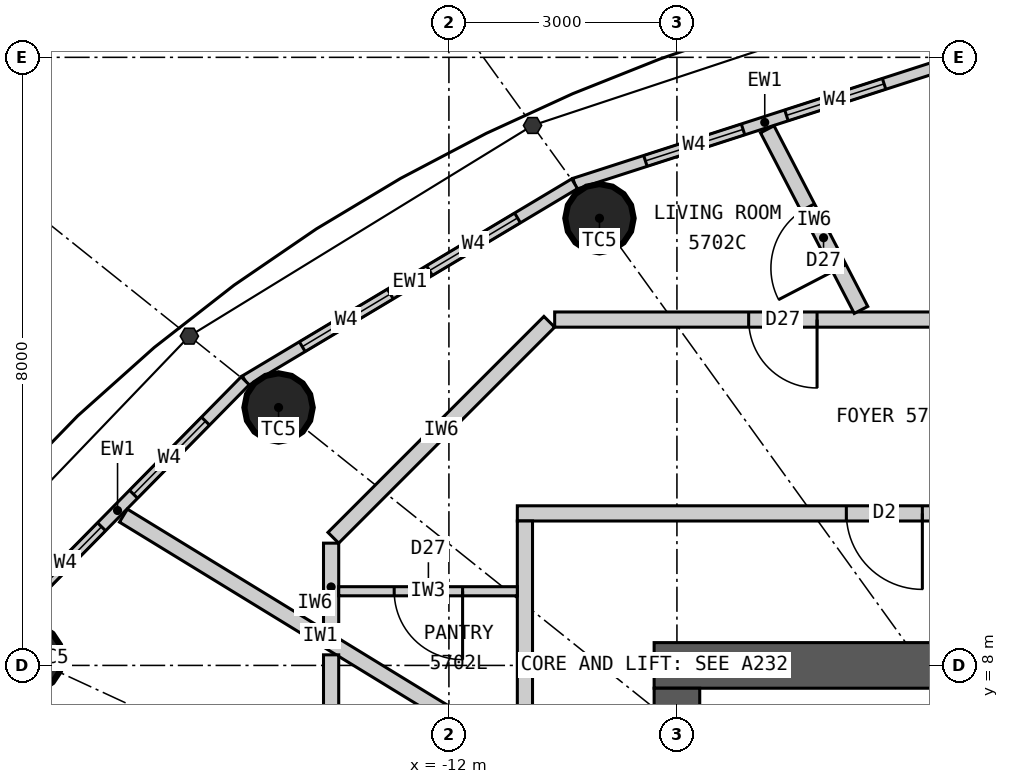
"""IFC4 building model, lengths in metres.
Left out: names, types, materials, properties, quantities, classifications, styles, units other than length and angle.
Written with IfcOpenShell. Run it as: python <this file> out.ifc"""

import sys

from ifc_helpers import new_model, si_unit, direction, frame, frame_2d, origin, origin_2d, place, context, subcontext, project, spatial, rectangle, circle, extrude, element, fill, save


model = new_model("IFC4")
c1 = context("Model", 3, precision=1e-05, world=origin(), true_north=direction((0.0, 1.0)))
c2 = subcontext(c1, "Body", "Model", "MODEL_VIEW")
j1 = project(units=[si_unit("LENGTHUNIT", "METRE"), si_unit("PLANEANGLEUNIT", "RADIAN")], contexts=[c1])
p1 = place(None, origin())
s1 = spatial("IfcSite", under=j1, at=p1, CompositionType="ELEMENT")
p2 = place(p1, origin())
s2 = spatial("IfcBuilding", under=s1, at=p2, CompositionType="ELEMENT")
p3 = place(p2, frame((0.0, 0.0, 212.7)))
s3 = spatial("IfcBuildingStorey", under=s2, at=p3, CompositionType="ELEMENT", Elevation=212.7)
for number, where, z_axis, x_axis in (
    (1, (-10.019, 13.883, 0.0), (0.0, 0.0, 1.0), (1.0, 0.0, 0.0)),
    (2, (-14.241, 11.393, 0.0), (0.0, 0.0, 1.0), (1.0, 0.0, 0.0)),
    (3, (-17.532, 8.098, 0.0), (0.0, 0.0, 1.0), (1.0, 0.0, 0.0)),
):
    element("IfcColumn", number, at=place(p3, frame(where, z_axis=z_axis, x_axis=x_axis)), inside=s3, PredefinedType="COLUMN", context=c2, shape_type="SweptSolid", body=[
        extrude(circle(Radius=0.45, at=origin_2d()), origin(), (0.0, 0.0, 1.0), 3.3),
    ])
p4 = place(p3, frame((-9.3, 8.0, 0.0), z_axis=(0.0, 0.0, 1.0), x_axis=(1.0, 0.0, 0.0)))
e4 = element("IfcWall", 4, at=p4, inside=s3, PredefinedType="SHEAR", context=c2, shape_type="SweptSolid", body=[
    extrude(rectangle(XDim=18.6, YDim=0.6, at=frame_2d((9.3, 0.0))), origin(), (0.0, 0.0, 1.0), 3.3),
])
p5 = place(p4, frame((8.0, 0.0, 0.0)))
e5 = element("IfcOpeningElement", 5, at=p5, cuts=e4, PredefinedType="OPENING", context=c2, shape_type="SweptSolid", body=[
    extrude(rectangle(XDim=1.2, YDim=2.2, at=frame_2d((0.6, 1.1))), frame((0.0, 0.31, 0.0), z_axis=(0.0, -1.0, 0.0), x_axis=(1.0, 0.0, 0.0)), (0.0, 0.0, 1.0), 0.62),
])
p6 = place(p4, frame((15.6, 0.0, 0.0)))
e6 = element("IfcOpeningElement", 6, at=p6, cuts=e4, PredefinedType="OPENING", context=c2, shape_type="SweptSolid", body=[
    extrude(rectangle(XDim=0.9, YDim=2.2, at=frame_2d((0.45, 1.1))), frame((0.0, 0.31, 0.0), z_axis=(0.0, -1.0, 0.0), x_axis=(1.0, 0.0, 0.0)), (0.0, 0.0, 1.0), 0.62),
])
p7 = place(p3, frame((-9.0, 7.7, 0.0), z_axis=(0.0, 0.0, 1.0), x_axis=(0.0, -1.0, 0.0)))
e7 = element("IfcWall", 7, at=p7, inside=s3, PredefinedType="SHEAR", context=c2, shape_type="SweptSolid", body=[
    extrude(rectangle(XDim=15.4, YDim=0.6, at=frame_2d((7.7, 0.0))), origin(), (0.0, 0.0, 1.0), 3.3),
])
p8 = place(p7, frame((6.8, 0.0, 0.0)))
e8 = element("IfcOpeningElement", 8, at=p8, cuts=e7, PredefinedType="OPENING", context=c2, shape_type="SweptSolid", body=[
    extrude(rectangle(XDim=1.8, YDim=2.2, at=frame_2d((0.9, 1.1))), frame((0.0, 0.31, 0.0), z_axis=(0.0, -1.0, 0.0), x_axis=(1.0, 0.0, 0.0)), (0.0, 0.0, 1.0), 0.62),
])
p9 = place(p3, frame((-5.343, 15.952, 0.0), z_axis=(0.0, 0.0, 1.0), x_axis=(-0.951644702515, -0.307200846638, 0.0)))
e9 = element("IfcWall", 9, at=p9, inside=s3, PredefinedType="ELEMENTEDWALL", context=c2, shape_type="SweptSolid", body=[
    extrude(rectangle(XDim=5.258, YDim=0.15, at=frame_2d((2.629, 0.0))), origin(), (0.0, 0.0, 1.0), 3.12),
])
p10 = place(p9, frame((0.979, 0.0, 0.9)))
e10 = element("IfcOpeningElement", 10, at=p10, cuts=e9, PredefinedType="OPENING", context=c2, shape_type="SweptSolid", body=[
    extrude(rectangle(XDim=1.35, YDim=1.9, at=frame_2d((0.675, 0.95))), frame((0.0, 0.085, 0.0), z_axis=(0.0, -1.0, 0.0), x_axis=(1.0, 0.0, 0.0)), (0.0, 0.0, 1.0), 0.17),
])
p11 = place(p9, frame((2.929, 0.0, 0.9)))
e11 = element("IfcOpeningElement", 11, at=p11, cuts=e9, PredefinedType="OPENING", context=c2, shape_type="SweptSolid", body=[
    extrude(rectangle(XDim=1.35, YDim=1.9, at=frame_2d((0.675, 0.95))), frame((0.0, 0.085, 0.0), z_axis=(0.0, -1.0, 0.0), x_axis=(1.0, 0.0, 0.0)), (0.0, 0.0, 1.0), 0.17),
])
p12 = place(p3, frame((-10.346, 14.336, 0.0), z_axis=(0.0, 0.0, 1.0), x_axis=(-0.85822150553, -0.513279502265, 0.0)))
e12 = element("IfcWall", 12, at=p12, inside=s3, PredefinedType="ELEMENTEDWALL", context=c2, shape_type="SweptSolid", body=[
    extrude(rectangle(XDim=5.05, YDim=0.15, at=frame_2d((2.525, 0.0))), origin(), (0.0, 0.0, 1.0), 3.12),
])
p13 = place(p12, frame((0.875, 0.0, 0.9)))
e13 = element("IfcOpeningElement", 13, at=p13, cuts=e12, PredefinedType="OPENING", context=c2, shape_type="SweptSolid", body=[
    extrude(rectangle(XDim=1.35, YDim=1.9, at=frame_2d((0.675, 0.95))), frame((0.0, 0.085, 0.0), z_axis=(0.0, -1.0, 0.0), x_axis=(1.0, 0.0, 0.0)), (0.0, 0.0, 1.0), 0.17),
])
p14 = place(p12, frame((2.825, 0.0, 0.9)))
e14 = element("IfcOpeningElement", 14, at=p14, cuts=e12, PredefinedType="OPENING", context=c2, shape_type="SweptSolid", body=[
    extrude(rectangle(XDim=1.35, YDim=1.9, at=frame_2d((0.675, 0.95))), frame((0.0, 0.085, 0.0), z_axis=(0.0, -1.0, 0.0), x_axis=(1.0, 0.0, 0.0)), (0.0, 0.0, 1.0), 0.17),
])
p15 = place(p3, frame((-14.68, 11.744, 0.0), z_axis=(0.0, 0.0, 1.0), x_axis=(-0.701527379618, -0.712642501993, 0.0)))
e15 = element("IfcWall", 15, at=p15, inside=s3, PredefinedType="ELEMENTEDWALL", context=c2, shape_type="SweptSolid", body=[
    extrude(rectangle(XDim=4.788, YDim=0.15, at=frame_2d((2.394, 0.0))), origin(), (0.0, 0.0, 1.0), 3.12),
])
p16 = place(p15, frame((0.744, 0.0, 0.9)))
e16 = element("IfcOpeningElement", 16, at=p16, cuts=e15, PredefinedType="OPENING", context=c2, shape_type="SweptSolid", body=[
    extrude(rectangle(XDim=1.35, YDim=1.9, at=frame_2d((0.675, 0.95))), frame((0.0, 0.085, 0.0), z_axis=(0.0, -1.0, 0.0), x_axis=(1.0, 0.0, 0.0)), (0.0, 0.0, 1.0), 0.17),
])
p17 = place(p15, frame((2.694, 0.0, 0.9)))
e17 = element("IfcOpeningElement", 17, at=p17, cuts=e15, PredefinedType="OPENING", context=c2, shape_type="SweptSolid", body=[
    extrude(rectangle(XDim=1.35, YDim=1.9, at=frame_2d((0.675, 0.95))), frame((0.0, 0.085, 0.0), z_axis=(0.0, -1.0, 0.0), x_axis=(1.0, 0.0, 0.0)), (0.0, 0.0, 1.0), 0.17),
])
p18 = place(p3, frame((-11.1, 10.0, 0.0), z_axis=(0.0, 0.0, 1.0), x_axis=(1.0, 0.0, 0.0)))
e18 = element("IfcWall", 18, at=p18, inside=s3, PredefinedType="PARTITIONING", context=c2, shape_type="SweptSolid", body=[
    extrude(rectangle(XDim=22.2, YDim=0.2, at=frame_2d((11.1, 0.0))), origin(), (0.0, 0.0, 1.0), 3.12),
])
p19 = place(p18, frame((20.9, 0.0, 0.0)))
e19 = element("IfcOpeningElement", 19, at=p19, cuts=e18, PredefinedType="OPENING", context=c2, shape_type="SweptSolid", body=[
    extrude(rectangle(XDim=1.0, YDim=2.2, at=frame_2d((0.5, 1.1))), frame((0.0, 0.11, 0.0), z_axis=(0.0, -1.0, 0.0), x_axis=(1.0, 0.0, 0.0)), (0.0, 0.0, 1.0), 0.22),
])
p20 = place(p18, frame((4.329, 0.0, 0.0)))
e20 = element("IfcOpeningElement", 20, at=p20, cuts=e18, PredefinedType="OPENING", context=c2, shape_type="SweptSolid", body=[
    extrude(rectangle(XDim=1.0, YDim=2.2, at=frame_2d((0.5, 1.1))), frame((0.0, 0.11, 0.0), z_axis=(0.0, -1.0, 0.0), x_axis=(1.0, 0.0, 0.0)), (0.0, 0.0, 1.0), 0.22),
])
p21 = place(p3, frame((-11.0, 9.9, 0.0), z_axis=(0.0, 0.0, 1.0), x_axis=(0.0, -1.0, 0.0)))
e21 = element("IfcWall", 21, at=p21, inside=s3, PredefinedType="PARTITIONING", context=c2, shape_type="SweptSolid", body=[
    extrude(rectangle(XDim=19.8, YDim=0.2, at=frame_2d((9.9, 0.0))), origin(), (0.0, 0.0, 1.0), 3.12),
])
p22 = place(p21, frame((5.075, 0.0, 0.0)))
e22 = element("IfcOpeningElement", 22, at=p22, cuts=e21, PredefinedType="OPENING", context=c2, shape_type="SweptSolid", body=[
    extrude(rectangle(XDim=1.0, YDim=2.2, at=frame_2d((0.5, 1.1))), frame((0.0, 0.11, 0.0), z_axis=(0.0, -1.0, 0.0), x_axis=(1.0, 0.0, 0.0)), (0.0, 0.0, 1.0), 0.22),
])
p23 = place(p21, frame((18.645, 0.0, 0.0)))
e23 = element("IfcOpeningElement", 23, at=p23, cuts=e21, PredefinedType="OPENING", context=c2, shape_type="SweptSolid", body=[
    extrude(rectangle(XDim=1.0, YDim=2.2, at=frame_2d((0.5, 1.1))), frame((0.0, 0.11, 0.0), z_axis=(0.0, -1.0, 0.0), x_axis=(1.0, 0.0, 0.0)), (0.0, 0.0, 1.0), 0.22),
])
p24 = place(p3, frame((-11.1, 6.797, 0.0), z_axis=(0.0, 0.0, 1.0), x_axis=(-0.852799818179, 0.522237943963, 0.0)))
e24 = element("IfcWall", 24, at=p24, inside=s3, PredefinedType="PARTITIONING", context=c2, shape_type="SweptSolid", body=[
    extrude(rectangle(XDim=6.077, YDim=0.2, at=frame_2d((3.039, 0.0))), origin(), (0.0, 0.0, 1.0), 3.12),
])
p25 = place(p3, frame((6.364, 12.55, 0.0), z_axis=(0.0, 0.0, 1.0), x_axis=(-1.0, 0.0, 0.0)))
e25 = element("IfcWall", 25, at=p25, inside=s3, PredefinedType="PARTITIONING", context=c2, shape_type="SweptSolid", body=[
    extrude(rectangle(XDim=16.972, YDim=0.2, at=frame_2d((8.486, 0.0))), origin(), (0.0, 0.0, 1.0), 3.12),
])
p26 = place(p25, frame((2.525, 0.0, 0.0)))
e26 = element("IfcOpeningElement", 26, at=p26, cuts=e25, PredefinedType="OPENING", context=c2, shape_type="SweptSolid", body=[
    extrude(rectangle(XDim=0.8, YDim=2.1, at=frame_2d((0.4, 1.05))), frame((0.0, 0.11, 0.0), z_axis=(0.0, -1.0, 0.0), x_axis=(1.0, 0.0, 0.0)), (0.0, 0.0, 1.0), 0.22),
])
p27 = place(p25, frame((4.145, 0.0, 0.0)))
e27 = element("IfcOpeningElement", 27, at=p27, cuts=e25, PredefinedType="OPENING", context=c2, shape_type="SweptSolid", body=[
    extrude(rectangle(XDim=0.9, YDim=2.1, at=frame_2d((0.45, 1.05))), frame((0.0, 0.11, 0.0), z_axis=(0.0, -1.0, 0.0), x_axis=(1.0, 0.0, 0.0)), (0.0, 0.0, 1.0), 0.22),
])
p28 = place(p25, frame((13.52, 0.0, 0.0)))
e28 = element("IfcOpeningElement", 28, at=p28, cuts=e25, PredefinedType="OPENING", context=c2, shape_type="SweptSolid", body=[
    extrude(rectangle(XDim=0.9, YDim=2.1, at=frame_2d((0.45, 1.05))), frame((0.0, 0.11, 0.0), z_axis=(0.0, -1.0, 0.0), x_axis=(1.0, 0.0, 0.0)), (0.0, 0.0, 1.0), 0.22),
])
p29 = place(p3, frame((-10.679, 12.521, 0.0), z_axis=(0.0, 0.0, 1.0), x_axis=(-0.707106781187, -0.707106781187, 0.0)))
e29 = element("IfcWall", 29, at=p29, inside=s3, PredefinedType="PARTITIONING", context=c2, shape_type="SweptSolid", body=[
    extrude(rectangle(XDim=4.019, YDim=0.2, at=frame_2d((2.009, 0.0))), origin(), (0.0, 0.0, 1.0), 3.12),
])
p30 = place(p3, frame((-13.55, 9.609, 0.0), z_axis=(0.0, 0.0, 1.0), x_axis=(0.0, -1.0, 0.0)))
e30 = element("IfcWall", 30, at=p30, inside=s3, PredefinedType="PARTITIONING", context=c2, shape_type="SweptSolid", body=[
    extrude(rectangle(XDim=1.153, YDim=0.2, at=frame_2d((0.576, 0.0))), origin(), (0.0, 0.0, 1.0), 3.12),
])
p31 = place(p3, frame((-6.578, 12.677, 0.0), z_axis=(0.0, 0.0, 1.0), x_axis=(-0.460620531465, 0.887597164255, 0.0)))
e31 = element("IfcWall", 31, at=p31, inside=s3, PredefinedType="PARTITIONING", context=c2, shape_type="SweptSolid", body=[
    extrude(rectangle(XDim=2.678, YDim=0.2, at=frame_2d((1.339, 0.0))), origin(), (0.0, 0.0, 1.0), 3.12),
])
p32 = place(p31, frame((0.62, 0.0, 0.0)))
e32 = element("IfcOpeningElement", 32, at=p32, cuts=e31, PredefinedType="OPENING", context=c2, shape_type="SweptSolid", body=[
    extrude(rectangle(XDim=0.9, YDim=2.1, at=frame_2d((0.45, 1.05))), frame((0.0, 0.11, 0.0), z_axis=(0.0, -1.0, 0.0), x_axis=(1.0, 0.0, 0.0)), (0.0, 0.0, 1.0), 0.22),
])
p33 = place(p3, frame((-11.1, 8.976, 0.0), z_axis=(0.0, 0.0, 1.0), x_axis=(-1.0, 0.0, 0.0)))
e33 = element("IfcWall", 33, at=p33, inside=s3, PredefinedType="PARTITIONING", context=c2, shape_type="SweptSolid", body=[
    extrude(rectangle(XDim=2.35, YDim=0.12, at=frame_2d((1.175, 0.0))), origin(), (0.0, 0.0, 1.0), 3.12),
])
p34 = place(p33, frame((0.72, 0.0, 0.0)))
e34 = element("IfcOpeningElement", 34, at=p34, cuts=e33, PredefinedType="OPENING", context=c2, shape_type="SweptSolid", body=[
    extrude(rectangle(XDim=0.9, YDim=2.1, at=frame_2d((0.45, 1.05))), frame((0.0, 0.07, 0.0), z_axis=(0.0, -1.0, 0.0), x_axis=(1.0, 0.0, 0.0)), (0.0, 0.0, 1.0), 0.14),
])
p35 = place(p3, frame((-13.55, 8.139, 0.0), z_axis=(0.0, 0.0, 1.0), x_axis=(0.0, -1.0, 0.0)))
e35 = element("IfcWall", 35, at=p35, inside=s3, PredefinedType="PARTITIONING", context=c2, shape_type="SweptSolid", body=[
    extrude(rectangle(XDim=12.496, YDim=0.2, at=frame_2d((6.248, 0.0))), origin(), (0.0, 0.0, 1.0), 3.12),
])
p36 = place(p35, frame((7.031, 0.0, 0.0)))
e36 = element("IfcOpeningElement", 36, at=p36, cuts=e35, PredefinedType="OPENING", context=c2, shape_type="SweptSolid", body=[
    extrude(rectangle(XDim=0.9, YDim=2.1, at=frame_2d((0.45, 1.05))), frame((0.0, 0.11, 0.0), z_axis=(0.0, -1.0, 0.0), x_axis=(1.0, 0.0, 0.0)), (0.0, 0.0, 1.0), 0.22),
])
p37 = place(p35, frame((9.373, 0.0, 0.0)))
e37 = element("IfcOpeningElement", 37, at=p37, cuts=e35, PredefinedType="OPENING", context=c2, shape_type="SweptSolid", body=[
    extrude(rectangle(XDim=0.8, YDim=2.1, at=frame_2d((0.4, 1.05))), frame((0.0, 0.11, 0.0), z_axis=(0.0, -1.0, 0.0), x_axis=(1.0, 0.0, 0.0)), (0.0, 0.0, 1.0), 0.22),
])
p38 = place(p35, frame((3.789, 0.0, 0.0)))
e38 = element("IfcOpeningElement", 38, at=p38, cuts=e35, PredefinedType="OPENING", context=c2, shape_type="SweptSolid", body=[
    extrude(rectangle(XDim=0.9, YDim=2.1, at=frame_2d((0.45, 1.05))), frame((0.0, 0.11, 0.0), z_axis=(0.0, -1.0, 0.0), x_axis=(1.0, 0.0, 0.0)), (0.0, 0.0, 1.0), 0.22),
])
p39 = place(p10, origin())
e39 = element("IfcWindow", 39, at=p39, inside=s3, PartitioningType="SINGLE_PANEL", PredefinedType="WINDOW", context=c2, shape_type="SweptSolid", body=[
    extrude(rectangle(XDim=1.35, YDim=1.9, at=frame_2d((0.675, 0.95))), frame((0.0, 0.03, 0.0), z_axis=(0.0, -1.0, 0.0), x_axis=(1.0, 0.0, 0.0)), (0.0, 0.0, 1.0), 0.06),
])
fill(e10, e39)
p40 = place(p11, origin())
e40 = element("IfcWindow", 40, at=p40, inside=s3, PartitioningType="SINGLE_PANEL", PredefinedType="WINDOW", context=c2, shape_type="SweptSolid", body=[
    extrude(rectangle(XDim=1.35, YDim=1.9, at=frame_2d((0.675, 0.95))), frame((0.0, 0.03, 0.0), z_axis=(0.0, -1.0, 0.0), x_axis=(1.0, 0.0, 0.0)), (0.0, 0.0, 1.0), 0.06),
])
fill(e11, e40)
p41 = place(p13, origin())
e41 = element("IfcWindow", 41, at=p41, inside=s3, PartitioningType="SINGLE_PANEL", PredefinedType="WINDOW", context=c2, shape_type="SweptSolid", body=[
    extrude(rectangle(XDim=1.35, YDim=1.9, at=frame_2d((0.675, 0.95))), frame((0.0, 0.03, 0.0), z_axis=(0.0, -1.0, 0.0), x_axis=(1.0, 0.0, 0.0)), (0.0, 0.0, 1.0), 0.06),
])
fill(e13, e41)
p42 = place(p14, origin())
e42 = element("IfcWindow", 42, at=p42, inside=s3, PartitioningType="SINGLE_PANEL", PredefinedType="WINDOW", context=c2, shape_type="SweptSolid", body=[
    extrude(rectangle(XDim=1.35, YDim=1.9, at=frame_2d((0.675, 0.95))), frame((0.0, 0.03, 0.0), z_axis=(0.0, -1.0, 0.0), x_axis=(1.0, 0.0, 0.0)), (0.0, 0.0, 1.0), 0.06),
])
fill(e14, e42)
p43 = place(p16, origin())
e43 = element("IfcWindow", 43, at=p43, inside=s3, PartitioningType="SINGLE_PANEL", PredefinedType="WINDOW", context=c2, shape_type="SweptSolid", body=[
    extrude(rectangle(XDim=1.35, YDim=1.9, at=frame_2d((0.675, 0.95))), frame((0.0, 0.03, 0.0), z_axis=(0.0, -1.0, 0.0), x_axis=(1.0, 0.0, 0.0)), (0.0, 0.0, 1.0), 0.06),
])
fill(e16, e43)
p44 = place(p17, origin())
e44 = element("IfcWindow", 44, at=p44, inside=s3, PartitioningType="SINGLE_PANEL", PredefinedType="WINDOW", context=c2, shape_type="SweptSolid", body=[
    extrude(rectangle(XDim=1.35, YDim=1.9, at=frame_2d((0.675, 0.95))), frame((0.0, 0.03, 0.0), z_axis=(0.0, -1.0, 0.0), x_axis=(1.0, 0.0, 0.0)), (0.0, 0.0, 1.0), 0.06),
])
fill(e17, e44)
p45 = place(p20, origin())
e45 = element("IfcDoor", 45, at=p45, inside=s3, OperationType="SINGLE_SWING_RIGHT", PredefinedType="DOOR", context=c2, shape_type="SweptSolid", body=[
    extrude(rectangle(XDim=1.0, YDim=2.2, at=frame_2d((0.5, 1.1))), frame((0.0, 0.025, 0.0), z_axis=(0.0, -1.0, 0.0), x_axis=(1.0, 0.0, 0.0)), (0.0, 0.0, 1.0), 0.05),
])
fill(e20, e45)
p46 = place(p34, origin())
e46 = element("IfcDoor", 46, at=p46, inside=s3, OperationType="SINGLE_SWING_LEFT", PredefinedType="DOOR", context=c2, shape_type="SweptSolid", body=[
    extrude(rectangle(XDim=0.9, YDim=2.1, at=frame_2d((0.45, 1.05))), frame((0.0, 0.025, 0.0), z_axis=(0.0, -1.0, 0.0), x_axis=(1.0, 0.0, 0.0)), (0.0, 0.0, 1.0), 0.05),
])
fill(e34, e46)
p47 = place(p28, origin())
e47 = element("IfcDoor", 47, at=p47, inside=s3, OperationType="SINGLE_SWING_LEFT", PredefinedType="DOOR", context=c2, shape_type="SweptSolid", body=[
    extrude(rectangle(XDim=0.9, YDim=2.1, at=frame_2d((0.45, 1.05))), frame((0.0, 0.025, 0.0), z_axis=(0.0, -1.0, 0.0), x_axis=(1.0, 0.0, 0.0)), (0.0, 0.0, 1.0), 0.05),
])
fill(e28, e47)
p48 = place(p32, origin())
e48 = element("IfcDoor", 48, at=p48, inside=s3, OperationType="SINGLE_SWING_LEFT", PredefinedType="DOOR", context=c2, shape_type="SweptSolid", body=[
    extrude(rectangle(XDim=0.9, YDim=2.1, at=frame_2d((0.45, 1.05))), frame((0.0, 0.025, 0.0), z_axis=(0.0, -1.0, 0.0), x_axis=(1.0, 0.0, 0.0)), (0.0, 0.0, 1.0), 0.05),
])
fill(e32, e48)
save(model, sys.argv[1])
